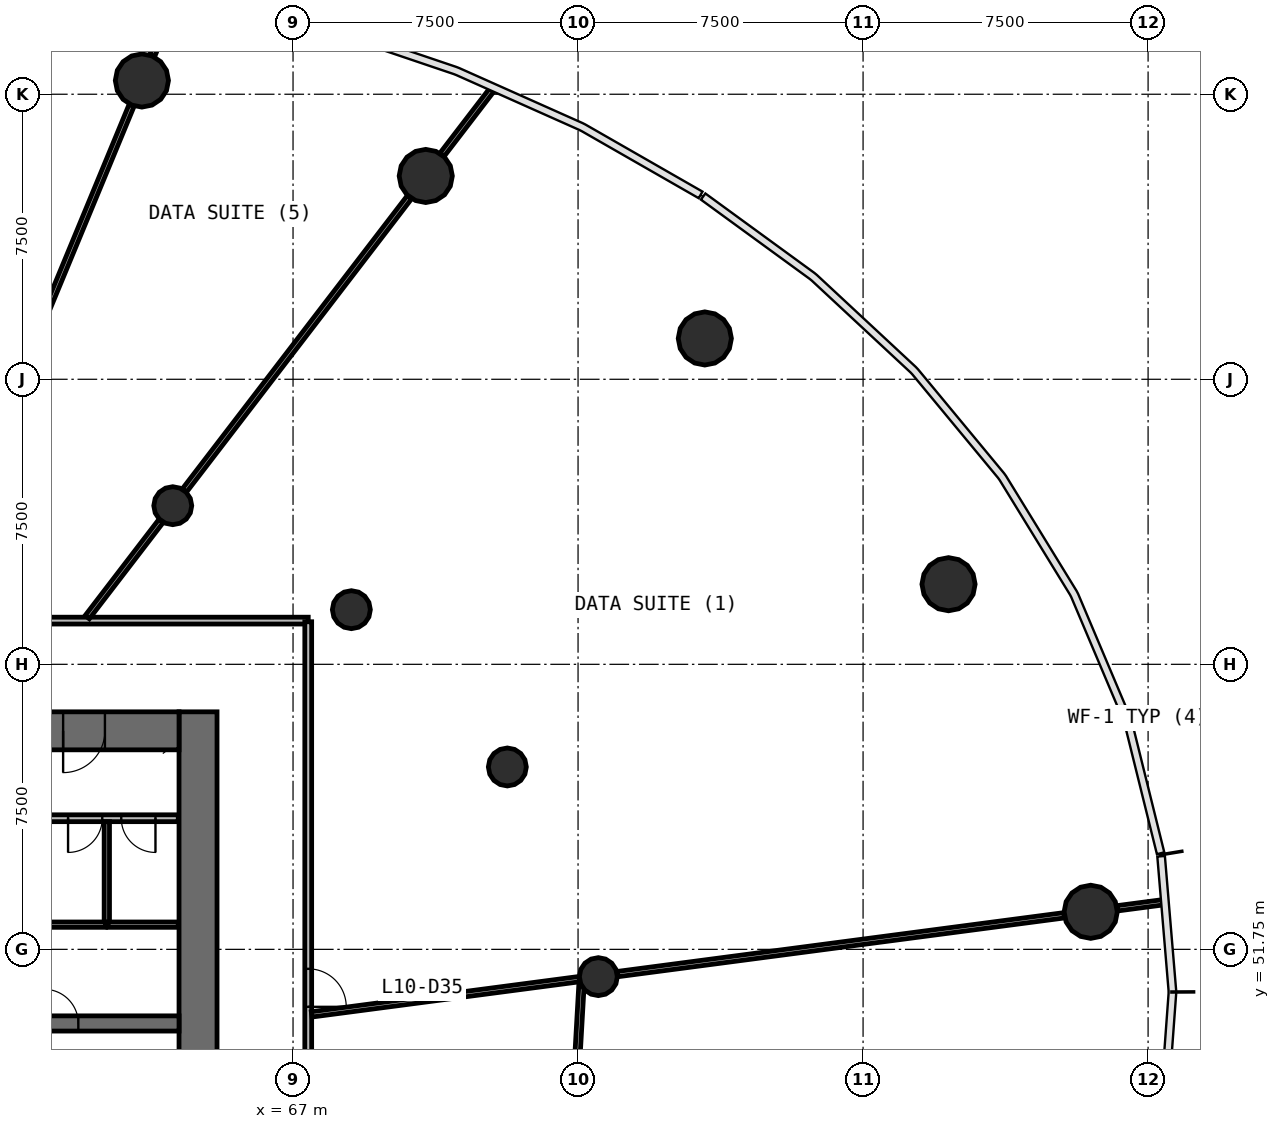
"""IFC4 building model, lengths in metres.
Left out: names, types, materials, properties, quantities, classifications, styles, units other than length and angle.
Written with IfcOpenShell. Run it as: python <this file> out.ifc"""

import sys

from ifc_helpers import new_model, si_unit, direction, frame, frame_2d, origin, origin_2d, place, context, subcontext, project, spatial, rectangle, circle, extrude, source, transform, mapped, element, fill, save


model = new_model("IFC4")
c1 = context("Model", 3, precision=1e-05, world=origin(), true_north=direction((0.0, 1.0)))
c2 = subcontext(c1, "Body", "Model", "MODEL_VIEW")
j1 = project(units=[si_unit("LENGTHUNIT", "METRE"), si_unit("PLANEANGLEUNIT", "RADIAN")], contexts=[c1])
p1 = place(None, origin())
s1 = spatial("IfcSite", under=j1, at=p1, CompositionType="ELEMENT")
p2 = place(p1, origin())
s2 = spatial("IfcBuilding", under=s1, at=p2, CompositionType="ELEMENT")
p3 = place(p2, frame((0.0, 0.0, 44.6)))
s3 = spatial("IfcBuildingStorey", under=s2, at=p3, CompositionType="ELEMENT", Elevation=44.6)
p4 = place(p3, frame((64.5, 38.0, 0.0), z_axis=(0.0, 0.0, 1.0), x_axis=(0.0, 1.0, 0.0)))
e1 = element("IfcWall", 1, at=p4, inside=s3, PredefinedType="SHEAR", context=c2, shape_type="SweptSolid", body=[
    extrude(rectangle(XDim=20.0, YDim=1.0, at=frame_2d((10.0, 0.0))), origin(), (0.0, 0.0, 1.0), 4.4),
])
p5 = place(p4, frame((9.1, 0.0, 0.0)))
e2 = element("IfcOpeningElement", 2, at=p5, cuts=e1, PredefinedType="OPENING", context=c2, shape_type="SweptSolid", body=[
    extrude(rectangle(XDim=1.8, YDim=2.1, at=frame_2d((0.9, 1.05))), frame((0.0, 0.51, 0.0), z_axis=(0.0, -1.0, 0.0), x_axis=(1.0, 0.0, 0.0)), (0.0, 0.0, 1.0), 1.02),
])
p6 = place(p3, frame((64.0, 57.5, 0.0), z_axis=(0.0, 0.0, 1.0), x_axis=(-1.0, 0.0, 0.0)))
e3 = element("IfcWall", 3, at=p6, inside=s3, PredefinedType="SHEAR", context=c2, shape_type="SweptSolid", body=[
    extrude(rectangle(XDim=24.0, YDim=1.0, at=frame_2d((12.0, 0.0))), origin(), (0.0, 0.0, 1.0), 4.4),
])
p7 = place(p6, frame((21.45, 0.0, 0.0)))
e4 = element("IfcOpeningElement", 4, at=p7, cuts=e3, PredefinedType="OPENING", context=c2, shape_type="SweptSolid", body=[
    extrude(rectangle(XDim=1.1, YDim=2.1, at=frame_2d((0.55, 1.05))), frame((0.0, 0.51, 0.0), z_axis=(0.0, -1.0, 0.0), x_axis=(1.0, 0.0, 0.0)), (0.0, 0.0, 1.0), 1.02),
])
p8 = place(p6, frame((1.95, 0.0, 0.0)))
e5 = element("IfcOpeningElement", 5, at=p8, cuts=e3, PredefinedType="OPENING", context=c2, shape_type="SweptSolid", body=[
    extrude(rectangle(XDim=1.1, YDim=2.1, at=frame_2d((0.55, 1.05))), frame((0.0, 0.51, 0.0), z_axis=(0.0, -1.0, 0.0), x_axis=(1.0, 0.0, 0.0)), (0.0, 0.0, 1.0), 1.02),
])
p9 = place(p3, frame((40.0, 49.8, 0.0), z_axis=(0.0, 0.0, 1.0), x_axis=(1.0, 0.0, 0.0)))
e6 = element("IfcWall", 6, at=p9, inside=s3, PredefinedType="SHEAR", context=c2, shape_type="SweptSolid", body=[
    extrude(rectangle(XDim=24.0, YDim=0.4, at=frame_2d((12.0, 0.0))), origin(), (0.0, 0.0, 1.0), 4.4),
])
p10 = place(p9, frame((4.5, 0.0, 0.0)))
e7 = element("IfcOpeningElement", 7, at=p10, cuts=e6, PredefinedType="OPENING", context=c2, shape_type="SweptSolid", body=[
    extrude(rectangle(XDim=1.1, YDim=2.1, at=frame_2d((0.55, 1.05))), frame((0.0, 0.21, 0.0), z_axis=(0.0, -1.0, 0.0), x_axis=(1.0, 0.0, 0.0)), (0.0, 0.0, 1.0), 0.42),
])
p11 = place(p9, frame((7.0, 0.0, 0.0)))
e8 = element("IfcOpeningElement", 8, at=p11, cuts=e6, PredefinedType="OPENING", context=c2, shape_type="SweptSolid", body=[
    extrude(rectangle(XDim=1.1, YDim=2.1, at=frame_2d((0.55, 1.05))), frame((0.0, 0.21, 0.0), z_axis=(0.0, -1.0, 0.0), x_axis=(1.0, 0.0, 0.0)), (0.0, 0.0, 1.0), 0.42),
])
p12 = place(p9, frame((9.5, 0.0, 0.0)))
e9 = element("IfcOpeningElement", 9, at=p12, cuts=e6, PredefinedType="OPENING", context=c2, shape_type="SweptSolid", body=[
    extrude(rectangle(XDim=1.1, YDim=2.1, at=frame_2d((0.55, 1.05))), frame((0.0, 0.21, 0.0), z_axis=(0.0, -1.0, 0.0), x_axis=(1.0, 0.0, 0.0)), (0.0, 0.0, 1.0), 0.42),
])
p13 = place(p9, frame((0.9, 0.0, 0.0)))
e10 = element("IfcOpeningElement", 10, at=p13, cuts=e6, PredefinedType="OPENING", context=c2, shape_type="SweptSolid", body=[
    extrude(rectangle(XDim=1.8, YDim=2.4, at=frame_2d((0.9, 1.2))), frame((0.0, 0.21, 0.0), z_axis=(0.0, -1.0, 0.0), x_axis=(1.0, 0.0, 0.0)), (0.0, 0.0, 1.0), 0.42),
])
p14 = place(p9, frame((20.45, 0.0, 0.0)))
e11 = element("IfcOpeningElement", 11, at=p14, cuts=e6, PredefinedType="OPENING", context=c2, shape_type="SweptSolid", body=[
    extrude(rectangle(XDim=0.9, YDim=2.1, at=frame_2d((0.45, 1.05))), frame((0.0, 0.21, 0.0), z_axis=(0.0, -1.0, 0.0), x_axis=(1.0, 0.0, 0.0)), (0.0, 0.0, 1.0), 0.42),
])
p15 = place(p9, frame((11.65, 0.0, 0.0)))
e12 = element("IfcOpeningElement", 12, at=p15, cuts=e6, PredefinedType="OPENING", context=c2, shape_type="SweptSolid", body=[
    extrude(rectangle(XDim=0.9, YDim=2.1, at=frame_2d((0.45, 1.05))), frame((0.0, 0.21, 0.0), z_axis=(0.0, -1.0, 0.0), x_axis=(1.0, 0.0, 0.0)), (0.0, 0.0, 1.0), 0.42),
])
m1 = source(origin(), c2, "Body", "SweptSolid", [
    extrude(circle(Radius=0.7, at=origin_2d()), origin(), (0.0, 0.0, 1.0), 4.4),
])
for number, where, z_axis, x_axis in (
    (13, (87.99, 52.738, 0.0), (0.0, 0.0, 1.0), (1.0, 0.0, 0.0)),
    (14, (84.249, 61.358, 0.0), (0.0, 0.0, 1.0), (1.0, 0.0, 0.0)),
    (15, (77.836, 67.824, 0.0), (0.0, 0.0, 1.0), (1.0, 0.0, 0.0)),
    (16, (70.492, 72.1, 0.0), (0.0, 0.0, 1.0), (1.0, 0.0, 0.0)),
    (17, (63.023, 74.611, 0.0), (0.0, 0.0, 1.0), (1.0, 0.0, 0.0)),
):
    element("IfcColumn", number, at=place(p3, frame(where, z_axis=z_axis, x_axis=x_axis)), inside=s3, PredefinedType="COLUMN", context=c2, shape_type="MappedRepresentation", body=[
        mapped(m1, transform((0.0, 0.0, 0.0), scale=1.0)),
    ])
m2 = source(origin(), c2, "Body", "SweptSolid", [
    extrude(circle(Radius=0.5, at=origin_2d()), origin(), (0.0, 0.0, 1.0), 4.4),
])
for number, where, z_axis, x_axis in (
    (18, (75.034, 51.032, 0.0), (0.0, 0.0, 1.0), (1.0, 0.0, 0.0)),
    (19, (72.639, 56.549, 0.0), (0.0, 0.0, 1.0), (1.0, 0.0, 0.0)),
    (20, (68.535, 60.688, 0.0), (0.0, 0.0, 1.0), (1.0, 0.0, 0.0)),
    (21, (63.835, 63.424, 0.0), (0.0, 0.0, 1.0), (1.0, 0.0, 0.0)),
):
    element("IfcColumn", number, at=place(p3, frame(where, z_axis=z_axis, x_axis=x_axis)), inside=s3, PredefinedType="COLUMN", context=c2, shape_type="MappedRepresentation", body=[
        mapped(m2, transform((0.0, 0.0, 0.0), scale=1.0)),
    ])
p16 = place(p3, frame((36.6, 60.4, 0.0), z_axis=(0.0, 0.0, 1.0), x_axis=(1.0, 0.0, 0.0)))
e22 = element("IfcWall", 22, at=p16, inside=s3, PredefinedType="PARTITIONING", context=c2, shape_type="SweptSolid", body=[
    extrude(rectangle(XDim=30.8, YDim=0.18, at=frame_2d((15.4, 0.0))), origin(), (0.0, 0.0, 1.0), 3.05),
])
p17 = place(p16, frame((20.95, 0.0, 0.0)))
e23 = element("IfcOpeningElement", 23, at=p17, cuts=e22, PredefinedType="OPENING", context=c2, shape_type="SweptSolid", body=[
    extrude(rectangle(XDim=1.0, YDim=2.1, at=frame_2d((0.5, 1.05))), frame((0.0, 0.1, 0.0), z_axis=(0.0, -1.0, 0.0), x_axis=(1.0, 0.0, 0.0)), (0.0, 0.0, 1.0), 0.2),
])
p18 = place(p16, frame((17.35, 0.0, 0.0)))
e24 = element("IfcOpeningElement", 24, at=p18, cuts=e22, PredefinedType="OPENING", context=c2, shape_type="SweptSolid", body=[
    extrude(rectangle(XDim=1.0, YDim=2.1, at=frame_2d((0.5, 1.05))), frame((0.0, 0.1, 0.0), z_axis=(0.0, -1.0, 0.0), x_axis=(1.0, 0.0, 0.0)), (0.0, 0.0, 1.0), 0.2),
])
p19 = place(p16, frame((14.95, 0.0, 0.0)))
e25 = element("IfcOpeningElement", 25, at=p19, cuts=e22, PredefinedType="OPENING", context=c2, shape_type="SweptSolid", body=[
    extrude(rectangle(XDim=1.0, YDim=2.1, at=frame_2d((0.5, 1.05))), frame((0.0, 0.1, 0.0), z_axis=(0.0, -1.0, 0.0), x_axis=(1.0, 0.0, 0.0)), (0.0, 0.0, 1.0), 0.2),
])
p20 = place(p3, frame((67.4, 60.37, 0.0), z_axis=(0.0, 0.0, 1.0), x_axis=(0.0, -1.0, 0.0)))
e26 = element("IfcWall", 26, at=p20, inside=s3, PredefinedType="PARTITIONING", context=c2, shape_type="SweptSolid", body=[
    extrude(rectangle(XDim=23.583, YDim=0.18, at=frame_2d((11.791, 0.0))), origin(), (0.0, 0.0, 1.0), 3.05),
])
p21 = place(p20, frame((11.333, 0.0, 0.0)))
e27 = element("IfcOpeningElement", 27, at=p21, cuts=e26, PredefinedType="OPENING", context=c2, shape_type="SweptSolid", body=[
    extrude(rectangle(XDim=1.0, YDim=2.1, at=frame_2d((0.5, 1.05))), frame((0.0, 0.1, 0.0), z_axis=(0.0, -1.0, 0.0), x_axis=(1.0, 0.0, 0.0)), (0.0, 0.0, 1.0), 0.2),
])
p22 = place(p20, frame((9.133, 0.0, 0.0)))
e28 = element("IfcOpeningElement", 28, at=p22, cuts=e26, PredefinedType="OPENING", context=c2, shape_type="SweptSolid", body=[
    extrude(rectangle(XDim=1.0, YDim=2.1, at=frame_2d((0.5, 1.05))), frame((0.0, 0.1, 0.0), z_axis=(0.0, -1.0, 0.0), x_axis=(1.0, 0.0, 0.0)), (0.0, 0.0, 1.0), 0.2),
])
p23 = place(p3, frame((63.98, 55.2, 0.0), z_axis=(0.0, 0.0, 1.0), x_axis=(-1.0, 0.0, 0.0)))
e29 = element("IfcWall", 29, at=p23, inside=s3, PredefinedType="PARTITIONING", context=c2, shape_type="SweptSolid", body=[
    extrude(rectangle(XDim=3.75, YDim=0.18, at=frame_2d((1.875, 0.0))), origin(), (0.0, 0.0, 1.0), 3.95),
])
p24 = place(p23, frame((2.0, 0.0, 0.0)))
e30 = element("IfcOpeningElement", 30, at=p24, cuts=e29, PredefinedType="OPENING", context=c2, shape_type="SweptSolid", body=[
    extrude(rectangle(XDim=0.9, YDim=2.1, at=frame_2d((0.45, 1.05))), frame((0.0, 0.1, 0.0), z_axis=(0.0, -1.0, 0.0), x_axis=(1.0, 0.0, 0.0)), (0.0, 0.0, 1.0), 0.2),
])
p25 = place(p23, frame((0.6, 0.0, 0.0)))
e31 = element("IfcOpeningElement", 31, at=p25, cuts=e29, PredefinedType="OPENING", context=c2, shape_type="SweptSolid", body=[
    extrude(rectangle(XDim=0.9, YDim=2.1, at=frame_2d((0.45, 1.05))), frame((0.0, 0.1, 0.0), z_axis=(0.0, -1.0, 0.0), x_axis=(1.0, 0.0, 0.0)), (0.0, 0.0, 1.0), 0.2),
])
p26 = place(p3, frame((75.534, 51.098, 0.0), z_axis=(0.0, 0.0, 1.0), x_axis=(0.991446586451, 0.130513088287, 0.0)))
e32 = element("IfcWall", 32, at=p26, inside=s3, PredefinedType="PARTITIONING", context=c2, shape_type="SweptSolid", body=[
    extrude(rectangle(XDim=11.86, YDim=0.14, at=frame_2d((5.93, 0.0))), origin(), (0.0, 0.0, 1.0), 3.05),
])
p27 = place(p3, frame((64.142, 63.824, 0.0), z_axis=(0.0, 0.0, 1.0), x_axis=(0.608770295053, 0.793346537057, 0.0)))
e33 = element("IfcWall", 33, at=p27, inside=s3, PredefinedType="PARTITIONING", context=c2, shape_type="SweptSolid", body=[
    extrude(rectangle(XDim=9.727, YDim=0.14, at=frame_2d((4.864, 0.0))), origin(), (0.0, 0.0, 1.0), 3.05),
])
p28 = place(p3, frame((59.248, 65.498, 0.0), z_axis=(0.0, 0.0, 1.0), x_axis=(0.382672728165, 0.923883966264, 0.0)))
e34 = element("IfcWall", 34, at=p28, inside=s3, PredefinedType="PARTITIONING", context=c2, shape_type="SweptSolid", body=[
    extrude(rectangle(XDim=9.16, YDim=0.14, at=frame_2d((4.58, 0.0))), origin(), (0.0, 0.0, 1.0), 3.05),
])
p29 = place(p3, frame((67.49, 50.039, 0.0), z_axis=(0.0, 0.0, 1.0), x_axis=(0.99144622305, 0.130515848849, 0.0)))
e35 = element("IfcWall", 35, at=p29, inside=s3, PredefinedType="PARTITIONING", context=c2, shape_type="SweptSolid", body=[
    extrude(rectangle(XDim=7.104, YDim=0.14, at=frame_2d((3.552, 0.0))), origin(), (0.0, 0.0, 1.0), 3.05),
])
p30 = place(p3, frame((74.589, 50.793, 0.0), z_axis=(0.0, 0.0, 1.0), x_axis=(-0.056551571082, -0.998399679391, 0.0)))
e36 = element("IfcWall", 36, at=p30, inside=s3, PredefinedType="PARTITIONING", context=c2, shape_type="SweptSolid", body=[
    extrude(rectangle(XDim=5.401, YDim=0.14, at=frame_2d((2.7, 0.0))), origin(), (0.0, 0.0, 1.0), 3.05),
])
p31 = place(p30, frame((2.151, 0.0, 0.0)))
e37 = element("IfcOpeningElement", 37, at=p31, cuts=e36, PredefinedType="OPENING", context=c2, shape_type="SweptSolid", body=[
    extrude(rectangle(XDim=1.0, YDim=2.1, at=frame_2d((0.5, 1.05))), frame((0.0, 0.08, 0.0), z_axis=(0.0, -1.0, 0.0), x_axis=(1.0, 0.0, 0.0)), (0.0, 0.0, 1.0), 0.16),
])
p32 = place(p3, frame((61.584, 60.49, 0.0), z_axis=(0.0, 0.0, 1.0), x_axis=(0.60874605662, 0.793365135703, 0.0)))
e38 = element("IfcWall", 38, at=p32, inside=s3, PredefinedType="PARTITIONING", context=c2, shape_type="SweptSolid", body=[
    extrude(rectangle(XDim=3.194, YDim=0.14, at=frame_2d((1.597, 0.0))), origin(), (0.0, 0.0, 1.0), 3.05),
])
p33 = place(p3, frame((62.1, 52.4, 0.0), z_axis=(0.0, 0.0, 1.0), x_axis=(0.0, 1.0, 0.0)))
e39 = element("IfcWall", 39, at=p33, inside=s3, PredefinedType="PARTITIONING", context=c2, shape_type="SweptSolid", body=[
    extrude(rectangle(XDim=2.71, YDim=0.14, at=frame_2d((1.355, 0.0))), origin(), (0.0, 0.0, 1.0), 3.05),
])
p34 = place(p3, frame((70.921, 72.658, 0.0), z_axis=(0.0, 0.0, 1.0), x_axis=(0.608822106268, 0.793306777306, 0.0)))
e40 = element("IfcWall", 40, at=p34, inside=s3, PredefinedType="PARTITIONING", context=c2, shape_type="SweptSolid", body=[
    extrude(rectangle(XDim=2.152, YDim=0.14, at=frame_2d((1.076, 0.0))), origin(), (0.0, 0.0, 1.0), 3.05),
])
p35 = place(p3, frame((62.07, 52.4, 0.0), z_axis=(0.0, 0.0, 1.0), x_axis=(-1.0, 0.0, 0.0)))
e41 = element("IfcWall", 41, at=p35, inside=s3, PredefinedType="PARTITIONING", context=c2, shape_type="SweptSolid", body=[
    extrude(rectangle(XDim=1.84, YDim=0.14, at=frame_2d((0.92, 0.0))), origin(), (0.0, 0.0, 1.0), 3.05),
])
p36 = place(p3, frame((63.98, 52.4, 0.0), z_axis=(0.0, 0.0, 1.0), x_axis=(-1.0, 0.0, 0.0)))
e42 = element("IfcWall", 42, at=p36, inside=s3, PredefinedType="PARTITIONING", context=c2, shape_type="SweptSolid", body=[
    extrude(rectangle(XDim=1.85, YDim=0.14, at=frame_2d((0.925, 0.0))), origin(), (0.0, 0.0, 1.0), 3.05),
])
p37 = place(p3, frame((63.292, 75.263, 0.0), z_axis=(0.0, 0.0, 1.0), x_axis=(0.382632674553, 0.923900555452, 0.0)))
e43 = element("IfcWall", 43, at=p37, inside=s3, PredefinedType="PARTITIONING", context=c2, shape_type="SweptSolid", body=[
    extrude(rectangle(XDim=1.714, YDim=0.14, at=frame_2d((0.857, 0.0))), origin(), (0.0, 0.0, 1.0), 3.05),
])
p38 = place(p3, frame((88.689, 52.83, 0.0), z_axis=(0.0, 0.0, 1.0), x_axis=(0.991424298155, 0.130682290411, 0.0)))
e44 = element("IfcWall", 44, at=p38, inside=s3, PredefinedType="PARTITIONING", context=c2, shape_type="SweptSolid", body=[
    extrude(rectangle(XDim=1.22, YDim=0.14, at=frame_2d((0.61, 0.0))), origin(), (0.0, 0.0, 1.0), 3.05),
])
m3 = source(origin(), c2, "Body", "SweptSolid", [
    extrude(rectangle(XDim=1.1, YDim=2.1, at=frame_2d((0.55, 1.05))), frame((0.0, 0.025, 0.0), z_axis=(0.0, -1.0, 0.0), x_axis=(1.0, 0.0, 0.0)), (0.0, 0.0, 1.0), 0.05),
])
p39 = place(p8, origin())
e45 = element("IfcDoor", 45, at=p39, inside=s3, OperationType="SINGLE_SWING_RIGHT", PredefinedType="DOOR", context=c2, shape_type="MappedRepresentation", body=[
    mapped(m3, transform((0.0, 0.0, 0.0), scale=1.0)),
])
fill(e5, e45)
m4 = source(origin(), c2, "Body", "SweptSolid", [
    extrude(rectangle(XDim=1.0, YDim=2.1, at=frame_2d((0.5, 1.05))), frame((0.0, 0.025, 0.0), z_axis=(0.0, -1.0, 0.0), x_axis=(1.0, 0.0, 0.0)), (0.0, 0.0, 1.0), 0.05),
])
p40 = place(p22, origin())
e46 = element("IfcDoor", 46, at=p40, inside=s3, OperationType="SINGLE_SWING_RIGHT", PredefinedType="DOOR", context=c2, shape_type="MappedRepresentation", body=[
    mapped(m4, transform((0.0, 0.0, 0.0), scale=1.0)),
])
fill(e28, e46)
m5 = source(origin(), c2, "Body", "SweptSolid", [
    extrude(rectangle(XDim=0.9, YDim=2.1, at=frame_2d((0.45, 1.05))), frame((0.0, 0.025, 0.0), z_axis=(0.0, -1.0, 0.0), x_axis=(1.0, 0.0, 0.0)), (0.0, 0.0, 1.0), 0.05),
])
p41 = place(p14, origin())
e47 = element("IfcDoor", 47, at=p41, inside=s3, OperationType="SINGLE_SWING_LEFT", PredefinedType="DOOR", context=c2, shape_type="MappedRepresentation", body=[
    mapped(m5, transform((0.0, 0.0, 0.0), scale=1.0)),
])
fill(e11, e47)
p42 = place(p24, origin())
e48 = element("IfcDoor", 48, at=p42, inside=s3, OperationType="SINGLE_SWING_RIGHT", PredefinedType="DOOR", context=c2, shape_type="MappedRepresentation", body=[
    mapped(m5, transform((0.0, 0.0, 0.0), scale=1.0)),
])
fill(e30, e48)
p43 = place(p25, origin())
e49 = element("IfcDoor", 49, at=p43, inside=s3, OperationType="SINGLE_SWING_LEFT", PredefinedType="DOOR", context=c2, shape_type="MappedRepresentation", body=[
    mapped(m5, transform((0.0, 0.0, 0.0), scale=1.0)),
])
fill(e31, e49)
save(model, sys.argv[1])
